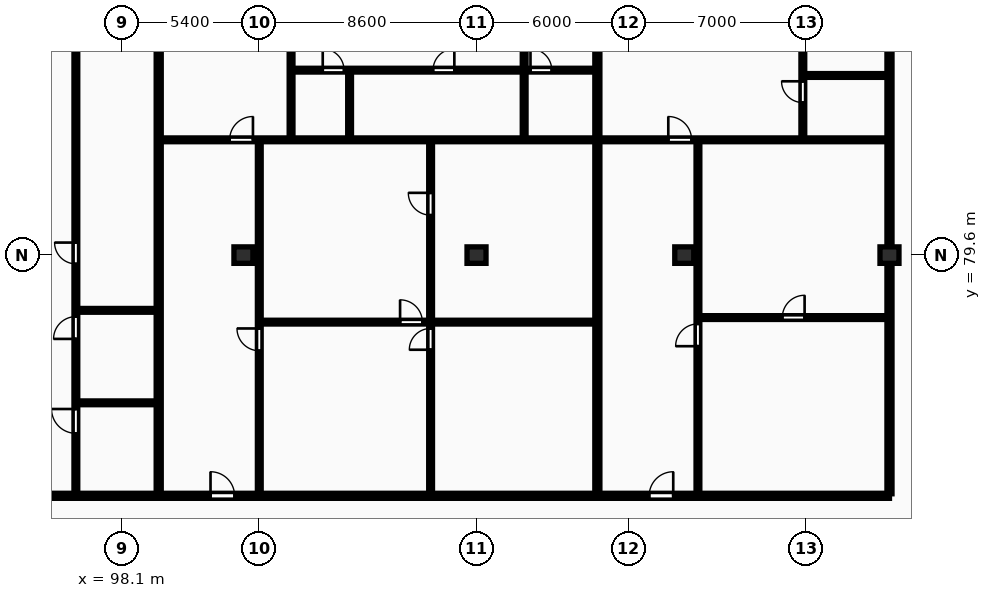
"""IFC4 building model, lengths in metres.
Left out: names, types, materials, properties, quantities, classifications, styles, units other than length and angle.
Written with IfcOpenShell. Run it as: python <this file> out.ifc"""

import sys

from ifc_helpers import new_model, si_unit, direction, frame, frame_2d, origin, origin_2d, place, context, subcontext, project, spatial, rectangle, extrude, element, fill, save


model = new_model("IFC4")
c1 = context("Model", 3, precision=1e-05, world=origin(), true_north=direction((0.0, 1.0)))
c2 = subcontext(c1, "Body", "Model", "MODEL_VIEW")
j1 = project(units=[si_unit("LENGTHUNIT", "METRE"), si_unit("PLANEANGLEUNIT", "RADIAN")], contexts=[c1])
p1 = place(None, origin())
s1 = spatial("IfcSite", under=j1, at=p1, CompositionType="ELEMENT")
p2 = place(p1, origin())
s2 = spatial("IfcBuilding", under=s1, at=p2, CompositionType="ELEMENT")
p3 = place(p2, frame((0.0, 0.0, 228.65)))
s3 = spatial("IfcBuildingStorey", under=s2, at=p3, CompositionType="ELEMENT", Elevation=228.65)
for number, where, z_axis, x_axis in (
    (1, (102.9, 79.6, 0.0), (0.0, 0.0, 1.0), (1.0, 0.0, 0.0)),
    (2, (112.1, 79.6, 0.0), (0.0, 0.0, 1.0), (1.0, 0.0, 0.0)),
    (3, (120.3, 79.6, 0.0), (0.0, 0.0, 1.0), (1.0, 0.0, 0.0)),
    (4, (128.4, 79.6, 0.0), (0.0, 0.0, 1.0), (1.0, 0.0, 0.0)),
):
    element("IfcColumn", number, at=place(p3, frame(where, z_axis=z_axis, x_axis=x_axis)), inside=s3, PredefinedType="COLUMN", context=c2, shape_type="SweptSolid", body=[
        extrude(rectangle(XDim=0.75, YDim=0.65, at=origin_2d()), origin(), (0.0, 0.0, 1.0), 3.45),
    ])
p4 = place(p3, frame((128.4, 70.18, 0.0), z_axis=(0.0, 0.0, 1.0), x_axis=(0.0, 1.0, 0.0)))
e5 = element("IfcWall", 5, at=p4, inside=s3, PredefinedType="PARTITIONING", context=c2, shape_type="SweptSolid", body=[
    extrude(rectangle(XDim=24.32, YDim=0.2, at=frame_2d((12.16, 0.0))), origin(), (0.0, 0.0, 1.0), 2.477),
])
p5 = place(p3, frame((99.556, 70.18, 0.0), z_axis=(0.0, 0.0, 1.0), x_axis=(0.0, 1.0, 0.0)))
e6 = element("IfcWall", 6, at=p5, inside=s3, PredefinedType="PARTITIONING", context=c2, shape_type="SweptSolid", body=[
    extrude(rectangle(XDim=24.32, YDim=0.2, at=frame_2d((12.16, 0.0))), origin(), (0.0, 0.0, 1.0), 3.17),
])
for number, where, z_axis, x_axis in (
    (7, (96.346, 73.77, 0.0), (0.0, 0.0, 1.0), (1.0, 0.0, 0.0)),
    (8, (96.346, 77.42, 0.0), (0.0, 0.0, 1.0), (1.0, 0.0, 0.0)),
):
    element("IfcWall", number, at=place(p3, frame(where, z_axis=z_axis, x_axis=x_axis)), inside=s3, PredefinedType="PARTITIONING", context=c2, shape_type="SweptSolid", body=[
        extrude(rectangle(XDim=3.13, YDim=0.15, at=frame_2d((1.565, 0.0))), origin(), (0.0, 0.0, 1.0), 3.17),
    ])
p6 = place(p3, frame((96.286, 70.16, 0.0), z_axis=(0.0, 0.0, 1.0), x_axis=(0.0, 1.0, 0.0)))
e9 = element("IfcWall", 9, at=p6, inside=s3, PredefinedType="PARTITIONING", context=c2, shape_type="SweptSolid", body=[
    extrude(rectangle(XDim=19.03, YDim=0.15, at=frame_2d((9.515, 0.0))), origin(), (0.0, 0.0, 1.0), 3.17),
])
p7 = place(p6, frame((2.406, 0.0, 0.0)))
e10 = element("IfcOpeningElement", 10, at=p7, cuts=e9, PredefinedType="OPENING", context=c2, shape_type="SweptSolid", body=[
    extrude(rectangle(XDim=0.96, YDim=2.1, at=frame_2d((0.48, 1.05))), frame((0.0, 0.085, 0.0), z_axis=(0.0, -1.0, 0.0), x_axis=(1.0, 0.0, 0.0)), (0.0, 0.0, 1.0), 0.17),
])
p8 = place(p6, frame((6.133, 0.0, 0.0)))
e11 = element("IfcOpeningElement", 11, at=p8, cuts=e9, PredefinedType="OPENING", context=c2, shape_type="SweptSolid", body=[
    extrude(rectangle(XDim=0.88, YDim=2.06, at=frame_2d((0.44, 1.03))), frame((0.0, 0.085, 0.0), z_axis=(0.0, -1.0, 0.0), x_axis=(1.0, 0.0, 0.0)), (0.0, 0.0, 1.0), 0.17),
])
p9 = place(p6, frame((9.095, 0.0, 0.0)))
e12 = element("IfcOpeningElement", 12, at=p9, cuts=e9, PredefinedType="OPENING", context=c2, shape_type="SweptSolid", body=[
    extrude(rectangle(XDim=0.84, YDim=2.04, at=frame_2d((0.42, 1.02))), frame((0.0, 0.085, 0.0), z_axis=(0.0, -1.0, 0.0), x_axis=(1.0, 0.0, 0.0)), (0.0, 0.0, 1.0), 0.17),
])
p10 = place(p3, frame((116.87, 70.18, 0.0), z_axis=(0.0, 0.0, 1.0), x_axis=(0.0, 1.0, 0.0)))
e13 = element("IfcWall", 13, at=p10, inside=s3, PredefinedType="PARTITIONING", context=c2, shape_type="SweptSolid", body=[
    extrude(rectangle(XDim=24.32, YDim=0.2, at=frame_2d((12.16, 0.0))), origin(), (0.0, 0.0, 1.0), 3.17),
])
p11 = place(p3, frame((110.288, 70.16, 0.0), z_axis=(0.0, 0.0, 1.0), x_axis=(0.0, 1.0, 0.0)))
e14 = element("IfcWall", 14, at=p11, inside=s3, PredefinedType="PARTITIONING", context=c2, shape_type="SweptSolid", body=[
    extrude(rectangle(XDim=13.95, YDim=0.15, at=frame_2d((6.975, 0.0))), origin(), (0.0, 0.0, 1.0), 3.17),
])
p12 = place(p11, frame((5.705, 0.0, 0.0)))
e15 = element("IfcOpeningElement", 15, at=p12, cuts=e14, PredefinedType="OPENING", context=c2, shape_type="SweptSolid", body=[
    extrude(rectangle(XDim=0.84, YDim=2.04, at=frame_2d((0.42, 1.02))), frame((0.0, 0.085, 0.0), z_axis=(0.0, -1.0, 0.0), x_axis=(1.0, 0.0, 0.0)), (0.0, 0.0, 1.0), 0.17),
])
p13 = place(p11, frame((11.018, 0.0, 0.0)))
e16 = element("IfcOpeningElement", 16, at=p13, cuts=e14, PredefinedType="OPENING", context=c2, shape_type="SweptSolid", body=[
    extrude(rectangle(XDim=0.88, YDim=2.06, at=frame_2d((0.44, 1.03))), frame((0.0, 0.085, 0.0), z_axis=(0.0, -1.0, 0.0), x_axis=(1.0, 0.0, 0.0)), (0.0, 0.0, 1.0), 0.17),
])
p14 = place(p3, frame((103.586, 76.955, 0.0), z_axis=(0.0, 0.0, 1.0), x_axis=(1.0, 0.0, 0.0)))
e17 = element("IfcWall", 17, at=p14, inside=s3, PredefinedType="PARTITIONING", context=c2, shape_type="SweptSolid", body=[
    extrude(rectangle(XDim=13.204, YDim=0.15, at=frame_2d((6.602, 0.0))), origin(), (0.0, 0.0, 1.0), 3.17),
])
p15 = place(p14, frame((5.497, 0.0, 0.0)))
e18 = element("IfcOpeningElement", 18, at=p15, cuts=e17, PredefinedType="OPENING", context=c2, shape_type="SweptSolid", body=[
    extrude(rectangle(XDim=0.88, YDim=2.06, at=frame_2d((0.44, 1.03))), frame((0.0, 0.085, 0.0), z_axis=(0.0, -1.0, 0.0), x_axis=(1.0, 0.0, 0.0)), (0.0, 0.0, 1.0), 0.17),
])
p16 = place(p3, frame((103.526, 70.16, 0.0), z_axis=(0.0, 0.0, 1.0), x_axis=(0.0, 1.0, 0.0)))
e19 = element("IfcWall", 19, at=p16, inside=s3, PredefinedType="PARTITIONING", context=c2, shape_type="SweptSolid", body=[
    extrude(rectangle(XDim=13.95, YDim=0.15, at=frame_2d((6.975, 0.0))), origin(), (0.0, 0.0, 1.0), 3.17),
])
p17 = place(p16, frame((5.665, 0.0, 0.0)))
e20 = element("IfcOpeningElement", 20, at=p17, cuts=e19, PredefinedType="OPENING", context=c2, shape_type="SweptSolid", body=[
    extrude(rectangle(XDim=0.88, YDim=2.06, at=frame_2d((0.44, 1.03))), frame((0.0, 0.085, 0.0), z_axis=(0.0, -1.0, 0.0), x_axis=(1.0, 0.0, 0.0)), (0.0, 0.0, 1.0), 0.17),
])
p18 = place(p3, frame((107.09, 84.19, 0.0), z_axis=(0.0, 0.0, 1.0), x_axis=(0.0, 1.0, 0.0)))
e21 = element("IfcWall", 21, at=p18, inside=s3, PredefinedType="PARTITIONING", context=c2, shape_type="SweptSolid", body=[
    extrude(rectangle(XDim=2.69, YDim=0.15, at=frame_2d((1.345, 0.0))), origin(), (0.0, 0.0, 1.0), 3.17),
])
p19 = place(p3, frame((104.78, 84.19, 0.0), z_axis=(0.0, 0.0, 1.0), x_axis=(0.0, 1.0, 0.0)))
e22 = element("IfcWall", 22, at=p19, inside=s3, PredefinedType="PARTITIONING", context=c2, shape_type="SweptSolid", body=[
    extrude(rectangle(XDim=10.31, YDim=0.15, at=frame_2d((5.155, 0.0))), origin(), (0.0, 0.0, 1.0), 3.17),
])
p20 = place(p19, frame((3.82, 0.0, 0.0)))
e23 = element("IfcOpeningElement", 23, at=p20, cuts=e22, PredefinedType="OPENING", context=c2, shape_type="SweptSolid", body=[
    extrude(rectangle(XDim=0.92, YDim=2.08, at=frame_2d((0.46, 1.04))), frame((0.0, 0.085, 0.0), z_axis=(0.0, -1.0, 0.0), x_axis=(1.0, 0.0, 0.0)), (0.0, 0.0, 1.0), 0.17),
])
p21 = place(p3, frame((113.98, 84.19, 0.0), z_axis=(0.0, 0.0, 1.0), x_axis=(0.0, 1.0, 0.0)))
e24 = element("IfcWall", 24, at=p21, inside=s3, PredefinedType="PARTITIONING", context=c2, shape_type="SweptSolid", body=[
    extrude(rectangle(XDim=2.69, YDim=0.15, at=frame_2d((1.345, 0.0))), origin(), (0.0, 0.0, 1.0), 3.17),
])
p22 = place(p3, frame((113.98, 86.92, 0.0), z_axis=(0.0, 0.0, 1.0), x_axis=(0.0, 1.0, 0.0)))
e25 = element("IfcWall", 25, at=p22, inside=s3, PredefinedType="PARTITIONING", context=c2, shape_type="SweptSolid", body=[
    extrude(rectangle(XDim=7.58, YDim=0.15, at=frame_2d((3.79, 0.0))), origin(), (0.0, 0.0, 1.0), 3.17),
])
p23 = place(p22, frame((1.09, 0.0, 0.0)))
e26 = element("IfcOpeningElement", 26, at=p23, cuts=e25, PredefinedType="OPENING", context=c2, shape_type="SweptSolid", body=[
    extrude(rectangle(XDim=0.92, YDim=2.08, at=frame_2d((0.46, 1.04))), frame((0.0, 0.085, 0.0), z_axis=(0.0, -1.0, 0.0), x_axis=(1.0, 0.0, 0.0)), (0.0, 0.0, 1.0), 0.17),
])
p24 = place(p3, frame((104.82, 86.9, 0.0), z_axis=(0.0, 0.0, 1.0), x_axis=(1.0, 0.0, 0.0)))
e27 = element("IfcWall", 27, at=p24, inside=s3, PredefinedType="PARTITIONING", context=c2, shape_type="SweptSolid", body=[
    extrude(rectangle(XDim=11.969, YDim=0.15, at=frame_2d((5.985, 0.0))), origin(), (0.0, 0.0, 1.0), 3.17),
])
p25 = place(p24, frame((1.21, 0.0, 0.0)))
e28 = element("IfcOpeningElement", 28, at=p25, cuts=e27, PredefinedType="OPENING", context=c2, shape_type="SweptSolid", body=[
    extrude(rectangle(XDim=0.84, YDim=2.04, at=frame_2d((0.42, 1.02))), frame((0.0, 0.085, 0.0), z_axis=(0.0, -1.0, 0.0), x_axis=(1.0, 0.0, 0.0)), (0.0, 0.0, 1.0), 0.17),
])
p26 = place(p24, frame((5.565, 0.0, 0.0)))
e29 = element("IfcOpeningElement", 29, at=p26, cuts=e27, PredefinedType="OPENING", context=c2, shape_type="SweptSolid", body=[
    extrude(rectangle(XDim=0.84, YDim=2.04, at=frame_2d((0.42, 1.02))), frame((0.0, 0.085, 0.0), z_axis=(0.0, -1.0, 0.0), x_axis=(1.0, 0.0, 0.0)), (0.0, 0.0, 1.0), 0.17),
])
p27 = place(p24, frame((9.41, 0.0, 0.0)))
e30 = element("IfcOpeningElement", 30, at=p27, cuts=e27, PredefinedType="OPENING", context=c2, shape_type="SweptSolid", body=[
    extrude(rectangle(XDim=0.84, YDim=2.04, at=frame_2d((0.42, 1.02))), frame((0.0, 0.085, 0.0), z_axis=(0.0, -1.0, 0.0), x_axis=(1.0, 0.0, 0.0)), (0.0, 0.0, 1.0), 0.17),
])
p28 = place(p3, frame((99.635, 84.15, 0.0), z_axis=(0.0, 0.0, 1.0), x_axis=(1.0, 0.0, 0.0)))
e31 = element("IfcWall", 31, at=p28, inside=s3, PredefinedType="PARTITIONING", context=c2, shape_type="SweptSolid", body=[
    extrude(rectangle(XDim=17.154, YDim=0.15, at=frame_2d((8.577, 0.0))), origin(), (0.0, 0.0, 1.0), 3.17),
])
p29 = place(p28, frame((2.72, 0.0, 0.0)))
e32 = element("IfcOpeningElement", 32, at=p29, cuts=e31, PredefinedType="OPENING", context=c2, shape_type="SweptSolid", body=[
    extrude(rectangle(XDim=0.92, YDim=2.08, at=frame_2d((0.46, 1.04))), frame((0.0, 0.085, 0.0), z_axis=(0.0, -1.0, 0.0), x_axis=(1.0, 0.0, 0.0)), (0.0, 0.0, 1.0), 0.17),
])
p30 = place(p3, frame((120.9, 77.135, 0.0), z_axis=(0.0, 0.0, 1.0), x_axis=(1.0, 0.0, 0.0)))
e33 = element("IfcWall", 33, at=p30, inside=s3, PredefinedType="PARTITIONING", context=c2, shape_type="SweptSolid", body=[
    extrude(rectangle(XDim=7.42, YDim=0.15, at=frame_2d((3.71, 0.0))), origin(), (0.0, 0.0, 1.0), 3.17),
])
p31 = place(p30, frame((3.27, 0.0, 0.0)))
e34 = element("IfcOpeningElement", 34, at=p31, cuts=e33, PredefinedType="OPENING", context=c2, shape_type="SweptSolid", body=[
    extrude(rectangle(XDim=0.88, YDim=2.06, at=frame_2d((0.44, 1.03))), frame((0.0, 0.085, 0.0), z_axis=(0.0, -1.0, 0.0), x_axis=(1.0, 0.0, 0.0)), (0.0, 0.0, 1.0), 0.17),
])
p32 = place(p3, frame((120.84, 70.16, 0.0), z_axis=(0.0, 0.0, 1.0), x_axis=(0.0, 1.0, 0.0)))
e35 = element("IfcWall", 35, at=p32, inside=s3, PredefinedType="PARTITIONING", context=c2, shape_type="SweptSolid", body=[
    extrude(rectangle(XDim=13.95, YDim=0.15, at=frame_2d((6.975, 0.0))), origin(), (0.0, 0.0, 1.0), 3.17),
])
p33 = place(p32, frame((5.845, 0.0, 0.0)))
e36 = element("IfcOpeningElement", 36, at=p33, cuts=e35, PredefinedType="OPENING", context=c2, shape_type="SweptSolid", body=[
    extrude(rectangle(XDim=0.88, YDim=2.06, at=frame_2d((0.44, 1.03))), frame((0.0, 0.085, 0.0), z_axis=(0.0, -1.0, 0.0), x_axis=(1.0, 0.0, 0.0)), (0.0, 0.0, 1.0), 0.17),
])
p34 = place(p3, frame((125.04, 86.69, 0.0), z_axis=(0.0, 0.0, 1.0), x_axis=(1.0, 0.0, 0.0)))
e37 = element("IfcWall", 37, at=p34, inside=s3, PredefinedType="PARTITIONING", context=c2, shape_type="SweptSolid", body=[
    extrude(rectangle(XDim=3.28, YDim=0.15, at=frame_2d((1.64, 0.0))), origin(), (0.0, 0.0, 1.0), 3.17),
])
p35 = place(p3, frame((124.98, 84.19, 0.0), z_axis=(0.0, 0.0, 1.0), x_axis=(0.0, 1.0, 0.0)))
e38 = element("IfcWall", 38, at=p35, inside=s3, PredefinedType="PARTITIONING", context=c2, shape_type="SweptSolid", body=[
    extrude(rectangle(XDim=10.31, YDim=0.15, at=frame_2d((5.155, 0.0))), origin(), (0.0, 0.0, 1.0), 3.17),
])
p36 = place(p35, frame((1.43, 0.0, 0.0)))
e39 = element("IfcOpeningElement", 39, at=p36, cuts=e38, PredefinedType="OPENING", context=c2, shape_type="SweptSolid", body=[
    extrude(rectangle(XDim=0.84, YDim=2.04, at=frame_2d((0.42, 1.02))), frame((0.0, 0.085, 0.0), z_axis=(0.0, -1.0, 0.0), x_axis=(1.0, 0.0, 0.0)), (0.0, 0.0, 1.0), 0.17),
])
p37 = place(p35, frame((3.92, 0.0, 0.0)))
e40 = element("IfcOpeningElement", 40, at=p37, cuts=e38, PredefinedType="OPENING", context=c2, shape_type="SweptSolid", body=[
    extrude(rectangle(XDim=0.84, YDim=2.04, at=frame_2d((0.42, 1.02))), frame((0.0, 0.085, 0.0), z_axis=(0.0, -1.0, 0.0), x_axis=(1.0, 0.0, 0.0)), (0.0, 0.0, 1.0), 0.17),
])
p38 = place(p35, frame((5.48, 0.0, 0.0)))
e41 = element("IfcOpeningElement", 41, at=p38, cuts=e38, PredefinedType="OPENING", context=c2, shape_type="SweptSolid", body=[
    extrude(rectangle(XDim=0.88, YDim=2.06, at=frame_2d((0.44, 1.03))), frame((0.0, 0.085, 0.0), z_axis=(0.0, -1.0, 0.0), x_axis=(1.0, 0.0, 0.0)), (0.0, 0.0, 1.0), 0.17),
])
p39 = place(p3, frame((116.95, 84.15, 0.0), z_axis=(0.0, 0.0, 1.0), x_axis=(1.0, 0.0, 0.0)))
e42 = element("IfcWall", 42, at=p39, inside=s3, PredefinedType="PARTITIONING", context=c2, shape_type="SweptSolid", body=[
    extrude(rectangle(XDim=11.37, YDim=0.15, at=frame_2d((5.685, 0.0))), origin(), (0.0, 0.0, 1.0), 3.17),
])
p40 = place(p39, frame((2.72, 0.0, 0.0)))
e43 = element("IfcOpeningElement", 43, at=p40, cuts=e42, PredefinedType="OPENING", context=c2, shape_type="SweptSolid", body=[
    extrude(rectangle(XDim=0.92, YDim=2.08, at=frame_2d((0.46, 1.04))), frame((0.0, 0.085, 0.0), z_axis=(0.0, -1.0, 0.0), x_axis=(1.0, 0.0, 0.0)), (0.0, 0.0, 1.0), 0.17),
])
p41 = place(p3, frame((59.8, 70.1, 0.0), z_axis=(0.0, 0.0, 1.0), x_axis=(1.0, 0.0, 0.0)))
e44 = element("IfcWall", 44, at=p41, inside=s3, PredefinedType="PARTITIONING", context=c2, shape_type="SweptSolid", body=[
    extrude(rectangle(XDim=68.6, YDim=0.2, at=frame_2d((34.3, 0.0))), origin(), (0.0, 0.0, 1.0), 3.17),
])
p42 = place(p41, frame((2.045, 0.0, 0.0)))
e45 = element("IfcOpeningElement", 45, at=p42, cuts=e44, PredefinedType="OPENING", context=c2, shape_type="SweptSolid", body=[
    extrude(rectangle(XDim=0.95, YDim=2.15, at=frame_2d((0.475, 1.075))), frame((0.0, 0.11, 0.0), z_axis=(0.0, -1.0, 0.0), x_axis=(1.0, 0.0, 0.0)), (0.0, 0.0, 1.0), 0.22),
])
p43 = place(p41, frame((29.246, 0.0, 0.0)))
e46 = element("IfcOpeningElement", 46, at=p43, cuts=e44, PredefinedType="OPENING", context=c2, shape_type="SweptSolid", body=[
    extrude(rectangle(XDim=1.22, YDim=2.18, at=frame_2d((0.61, 1.09))), frame((0.0, 0.11, 0.0), z_axis=(0.0, -1.0, 0.0), x_axis=(1.0, 0.0, 0.0)), (0.0, 0.0, 1.0), 0.22),
])
p44 = place(p41, frame((41.801, 0.0, 0.0)))
e47 = element("IfcOpeningElement", 47, at=p44, cuts=e44, PredefinedType="OPENING", context=c2, shape_type="SweptSolid", body=[
    extrude(rectangle(XDim=0.95, YDim=2.15, at=frame_2d((0.475, 1.075))), frame((0.0, 0.11, 0.0), z_axis=(0.0, -1.0, 0.0), x_axis=(1.0, 0.0, 0.0)), (0.0, 0.0, 1.0), 0.22),
])
p45 = place(p41, frame((59.115, 0.0, 0.0)))
e48 = element("IfcOpeningElement", 48, at=p45, cuts=e44, PredefinedType="OPENING", context=c2, shape_type="SweptSolid", body=[
    extrude(rectangle(XDim=0.95, YDim=2.15, at=frame_2d((0.475, 1.075))), frame((0.0, 0.11, 0.0), z_axis=(0.0, -1.0, 0.0), x_axis=(1.0, 0.0, 0.0)), (0.0, 0.0, 1.0), 0.22),
])
p46 = place(p7, origin())
e49 = element("IfcDoor", 49, at=p46, inside=s3, OperationType="SINGLE_SWING_RIGHT", PredefinedType="DOOR", context=c2, shape_type="SweptSolid", body=[
    extrude(rectangle(XDim=0.96, YDim=2.1, at=frame_2d((0.48, 1.05))), frame((0.0, 0.025, 0.0), z_axis=(0.0, -1.0, 0.0), x_axis=(1.0, 0.0, 0.0)), (0.0, 0.0, 1.0), 0.05),
])
fill(e10, e49)
p47 = place(p8, origin())
e50 = element("IfcDoor", 50, at=p47, inside=s3, OperationType="SINGLE_SWING_LEFT", PredefinedType="DOOR", context=c2, shape_type="SweptSolid", body=[
    extrude(rectangle(XDim=0.88, YDim=2.06, at=frame_2d((0.44, 1.03))), frame((0.0, 0.025, 0.0), z_axis=(0.0, -1.0, 0.0), x_axis=(1.0, 0.0, 0.0)), (0.0, 0.0, 1.0), 0.05),
])
fill(e11, e50)
p48 = place(p9, origin())
e51 = element("IfcDoor", 51, at=p48, inside=s3, OperationType="SINGLE_SWING_RIGHT", PredefinedType="DOOR", context=c2, shape_type="SweptSolid", body=[
    extrude(rectangle(XDim=0.84, YDim=2.04, at=frame_2d((0.42, 1.02))), frame((0.0, 0.025, 0.0), z_axis=(0.0, -1.0, 0.0), x_axis=(1.0, 0.0, 0.0)), (0.0, 0.0, 1.0), 0.05),
])
fill(e12, e51)
p49 = place(p12, origin())
e52 = element("IfcDoor", 52, at=p49, inside=s3, OperationType="SINGLE_SWING_LEFT", PredefinedType="DOOR", context=c2, shape_type="SweptSolid", body=[
    extrude(rectangle(XDim=0.84, YDim=2.04, at=frame_2d((0.42, 1.02))), frame((0.0, 0.025, 0.0), z_axis=(0.0, -1.0, 0.0), x_axis=(1.0, 0.0, 0.0)), (0.0, 0.0, 1.0), 0.05),
])
fill(e15, e52)
p50 = place(p13, origin())
e53 = element("IfcDoor", 53, at=p50, inside=s3, OperationType="SINGLE_SWING_RIGHT", PredefinedType="DOOR", context=c2, shape_type="SweptSolid", body=[
    extrude(rectangle(XDim=0.88, YDim=2.06, at=frame_2d((0.44, 1.03))), frame((0.0, 0.025, 0.0), z_axis=(0.0, -1.0, 0.0), x_axis=(1.0, 0.0, 0.0)), (0.0, 0.0, 1.0), 0.05),
])
fill(e16, e53)
p51 = place(p15, origin())
e54 = element("IfcDoor", 54, at=p51, inside=s3, OperationType="SINGLE_SWING_LEFT", PredefinedType="DOOR", context=c2, shape_type="SweptSolid", body=[
    extrude(rectangle(XDim=0.88, YDim=2.06, at=frame_2d((0.44, 1.03))), frame((0.0, 0.025, 0.0), z_axis=(0.0, -1.0, 0.0), x_axis=(1.0, 0.0, 0.0)), (0.0, 0.0, 1.0), 0.05),
])
fill(e18, e54)
p52 = place(p17, origin())
e55 = element("IfcDoor", 55, at=p52, inside=s3, OperationType="SINGLE_SWING_RIGHT", PredefinedType="DOOR", context=c2, shape_type="SweptSolid", body=[
    extrude(rectangle(XDim=0.88, YDim=2.06, at=frame_2d((0.44, 1.03))), frame((0.0, 0.025, 0.0), z_axis=(0.0, -1.0, 0.0), x_axis=(1.0, 0.0, 0.0)), (0.0, 0.0, 1.0), 0.05),
])
fill(e20, e55)
p53 = place(p25, origin())
e56 = element("IfcDoor", 56, at=p53, inside=s3, OperationType="SINGLE_SWING_LEFT", PredefinedType="DOOR", context=c2, shape_type="SweptSolid", body=[
    extrude(rectangle(XDim=0.84, YDim=2.04, at=frame_2d((0.42, 1.02))), frame((0.0, 0.025, 0.0), z_axis=(0.0, -1.0, 0.0), x_axis=(1.0, 0.0, 0.0)), (0.0, 0.0, 1.0), 0.05),
])
fill(e28, e56)
p54 = place(p26, origin())
e57 = element("IfcDoor", 57, at=p54, inside=s3, OperationType="SINGLE_SWING_RIGHT", PredefinedType="DOOR", context=c2, shape_type="SweptSolid", body=[
    extrude(rectangle(XDim=0.84, YDim=2.04, at=frame_2d((0.42, 1.02))), frame((0.0, 0.025, 0.0), z_axis=(0.0, -1.0, 0.0), x_axis=(1.0, 0.0, 0.0)), (0.0, 0.0, 1.0), 0.05),
])
fill(e29, e57)
p55 = place(p27, origin())
e58 = element("IfcDoor", 58, at=p55, inside=s3, OperationType="SINGLE_SWING_LEFT", PredefinedType="DOOR", context=c2, shape_type="SweptSolid", body=[
    extrude(rectangle(XDim=0.84, YDim=2.04, at=frame_2d((0.42, 1.02))), frame((0.0, 0.025, 0.0), z_axis=(0.0, -1.0, 0.0), x_axis=(1.0, 0.0, 0.0)), (0.0, 0.0, 1.0), 0.05),
])
fill(e30, e58)
p56 = place(p29, origin())
e59 = element("IfcDoor", 59, at=p56, inside=s3, OperationType="SINGLE_SWING_RIGHT", PredefinedType="DOOR", context=c2, shape_type="SweptSolid", body=[
    extrude(rectangle(XDim=0.92, YDim=2.08, at=frame_2d((0.46, 1.04))), frame((0.0, 0.025, 0.0), z_axis=(0.0, -1.0, 0.0), x_axis=(1.0, 0.0, 0.0)), (0.0, 0.0, 1.0), 0.05),
])
fill(e32, e59)
p57 = place(p31, origin())
e60 = element("IfcDoor", 60, at=p57, inside=s3, OperationType="SINGLE_SWING_RIGHT", PredefinedType="DOOR", context=c2, shape_type="SweptSolid", body=[
    extrude(rectangle(XDim=0.88, YDim=2.06, at=frame_2d((0.44, 1.03))), frame((0.0, 0.025, 0.0), z_axis=(0.0, -1.0, 0.0), x_axis=(1.0, 0.0, 0.0)), (0.0, 0.0, 1.0), 0.05),
])
fill(e34, e60)
p58 = place(p33, origin())
e61 = element("IfcDoor", 61, at=p58, inside=s3, OperationType="SINGLE_SWING_LEFT", PredefinedType="DOOR", context=c2, shape_type="SweptSolid", body=[
    extrude(rectangle(XDim=0.88, YDim=2.06, at=frame_2d((0.44, 1.03))), frame((0.0, 0.025, 0.0), z_axis=(0.0, -1.0, 0.0), x_axis=(1.0, 0.0, 0.0)), (0.0, 0.0, 1.0), 0.05),
])
fill(e36, e61)
p59 = place(p36, origin())
e62 = element("IfcDoor", 62, at=p59, inside=s3, OperationType="SINGLE_SWING_RIGHT", PredefinedType="DOOR", context=c2, shape_type="SweptSolid", body=[
    extrude(rectangle(XDim=0.84, YDim=2.04, at=frame_2d((0.42, 1.02))), frame((0.0, 0.025, 0.0), z_axis=(0.0, -1.0, 0.0), x_axis=(1.0, 0.0, 0.0)), (0.0, 0.0, 1.0), 0.05),
])
fill(e39, e62)
p60 = place(p40, origin())
e63 = element("IfcDoor", 63, at=p60, inside=s3, OperationType="SINGLE_SWING_LEFT", PredefinedType="DOOR", context=c2, shape_type="SweptSolid", body=[
    extrude(rectangle(XDim=0.92, YDim=2.08, at=frame_2d((0.46, 1.04))), frame((0.0, 0.025, 0.0), z_axis=(0.0, -1.0, 0.0), x_axis=(1.0, 0.0, 0.0)), (0.0, 0.0, 1.0), 0.05),
])
fill(e43, e63)
p61 = place(p44, origin())
e64 = element("IfcDoor", 64, at=p61, inside=s3, OperationType="SINGLE_SWING_LEFT", PredefinedType="DOOR", context=c2, shape_type="SweptSolid", body=[
    extrude(rectangle(XDim=0.95, YDim=2.15, at=frame_2d((0.475, 1.075))), frame((0.0, 0.025, 0.0), z_axis=(0.0, -1.0, 0.0), x_axis=(1.0, 0.0, 0.0)), (0.0, 0.0, 1.0), 0.05),
])
fill(e47, e64)
p62 = place(p45, origin())
e65 = element("IfcDoor", 65, at=p62, inside=s3, OperationType="SINGLE_SWING_RIGHT", PredefinedType="DOOR", context=c2, shape_type="SweptSolid", body=[
    extrude(rectangle(XDim=0.95, YDim=2.15, at=frame_2d((0.475, 1.075))), frame((0.0, 0.025, 0.0), z_axis=(0.0, -1.0, 0.0), x_axis=(1.0, 0.0, 0.0)), (0.0, 0.0, 1.0), 0.05),
])
fill(e48, e65)
save(model, sys.argv[1])
